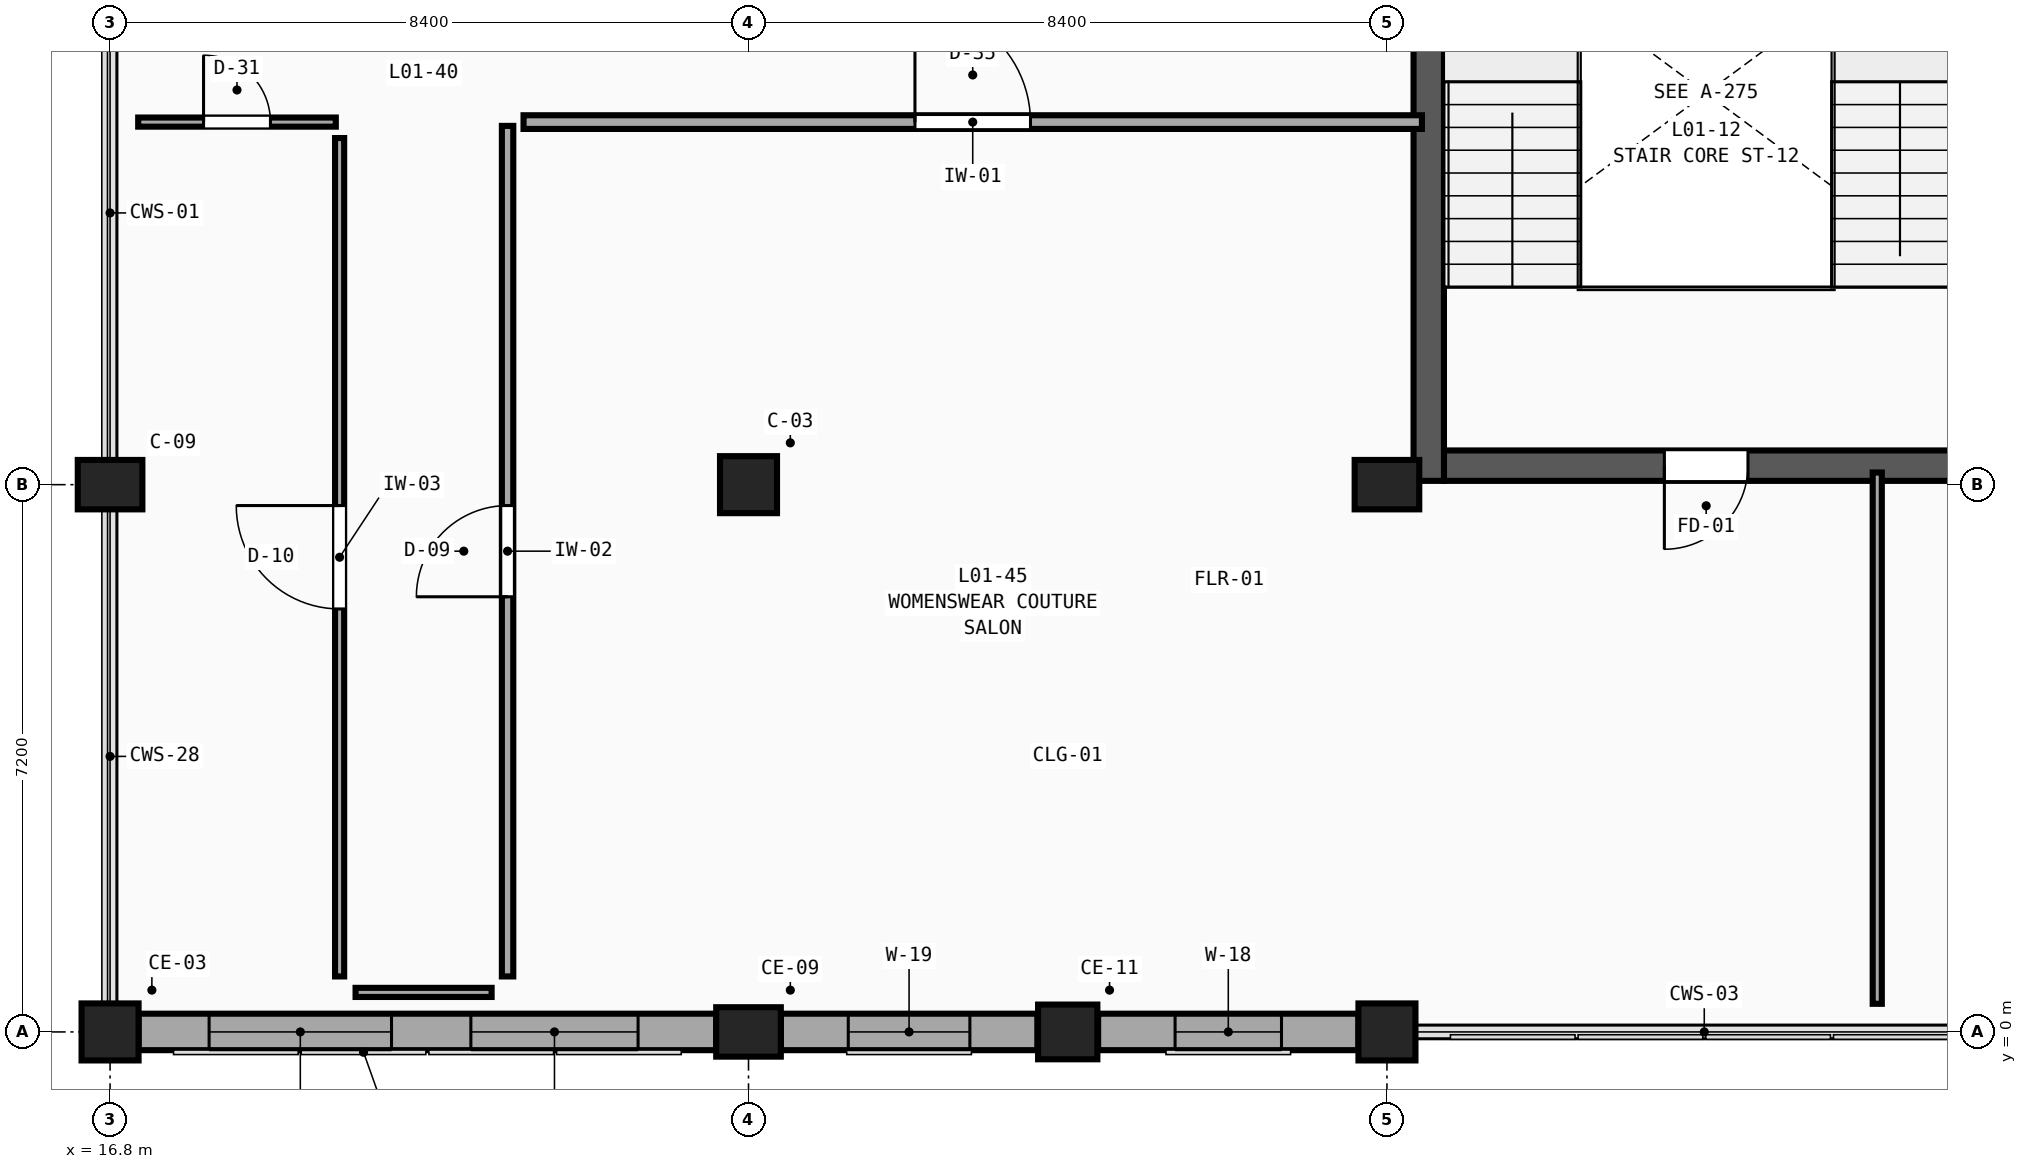
"""IFC4 building model, lengths in metres.
Left out: names, types, materials, properties, quantities, classifications, styles, units other than length and angle.
Written with IfcOpenShell. Run it as: python <this file> out.ifc"""

import sys

from ifc_helpers import new_model, si_unit, direction, frame, frame_2d, origin, origin_2d, place, context, subcontext, project, spatial, rectangle, extrude, element, fill, save


model = new_model("IFC4")
c1 = context("Model", 3, precision=1e-05, world=origin(), true_north=direction((0.0, 1.0)))
c2 = subcontext(c1, "Body", "Model", "MODEL_VIEW")
j1 = project(units=[si_unit("LENGTHUNIT", "METRE"), si_unit("PLANEANGLEUNIT", "RADIAN")], contexts=[c1])
p1 = place(None, origin())
s1 = spatial("IfcSite", under=j1, at=p1, CompositionType="ELEMENT")
p2 = place(p1, origin())
s2 = spatial("IfcBuilding", under=s1, at=p2, CompositionType="ELEMENT")
p3 = place(p2, frame((0.0, 0.0, 5.4)))
s3 = spatial("IfcBuildingStorey", under=s2, at=p3, CompositionType="ELEMENT", Elevation=5.4)
p4 = place(p3, frame((16.8, 0.0, 0.0), z_axis=(0.0, 0.0, 1.0), x_axis=(1.0, 0.0, 0.0)))
e1 = element("IfcColumn", 1, at=p4, inside=s3, PredefinedType="COLUMN", context=c2, shape_type="SweptSolid", body=[
    extrude(rectangle(XDim=0.75, YDim=0.75, at=origin_2d()), origin(), (0.0, 0.0, 1.0), 4.5),
])
for number, where, z_axis, x_axis in (
    (2, (16.8, 7.2, 0.0), (0.0, 0.0, 1.0), (1.0, 0.0, 0.0)),
    (3, (25.2, 0.0, 0.0), (0.0, 0.0, 1.0), (1.0, 0.0, 0.0)),
):
    element("IfcColumn", number, at=place(p3, frame(where, z_axis=z_axis, x_axis=x_axis)), inside=s3, PredefinedType="COLUMN", context=c2, shape_type="SweptSolid", body=[
        extrude(rectangle(XDim=0.85, YDim=0.65, at=origin_2d()), origin(), (0.0, 0.0, 1.0), 4.5),
    ])
for number, where, z_axis, x_axis in (
    (4, (25.2, 7.2, 0.0), (0.0, 0.0, 1.0), (1.0, 0.0, 0.0)),
    (5, (33.6, 0.0, 0.0), (0.0, 0.0, 1.0), (1.0, 0.0, 0.0)),
):
    element("IfcColumn", number, at=place(p3, frame(where, z_axis=z_axis, x_axis=x_axis)), inside=s3, PredefinedType="COLUMN", context=c2, shape_type="SweptSolid", body=[
        extrude(rectangle(XDim=0.75, YDim=0.75, at=origin_2d()), origin(), (0.0, 0.0, 1.0), 4.5),
    ])
p5 = place(p3, frame((33.6, 7.2, 0.0), z_axis=(0.0, 0.0, 1.0), x_axis=(1.0, 0.0, 0.0)))
e6 = element("IfcColumn", 6, at=p5, inside=s3, PredefinedType="COLUMN", context=c2, shape_type="SweptSolid", body=[
    extrude(rectangle(XDim=0.85, YDim=0.65, at=origin_2d()), origin(), (0.0, 0.0, 1.0), 4.5),
])
p6 = place(p3, frame((29.4, 0.0, 0.0), z_axis=(0.0, 0.0, 1.0), x_axis=(1.0, 0.0, 0.0)))
e7 = element("IfcColumn", 7, at=p6, inside=s3, PredefinedType="PILASTER", context=c2, shape_type="SweptSolid", body=[
    extrude(rectangle(XDim=0.78, YDim=0.72, at=origin_2d()), origin(), (0.0, 0.0, 1.0), 4.5),
])
p7 = place(p3, frame((24.775, 0.0, 0.0), z_axis=(0.0, 0.0, 1.0), x_axis=(-1.0, 0.0, 0.0)))
e8 = element("IfcWall", 8, at=p7, inside=s3, PredefinedType="SOLIDWALL", context=c2, shape_type="SweptSolid", body=[
    extrude(rectangle(XDim=7.6, YDim=0.48, at=frame_2d((3.8, 0.0))), origin(), (0.0, 0.0, 1.0), 3.63),
])
p8 = place(p7, frame((1.028, 0.0, 0.75)))
e9 = element("IfcOpeningElement", 9, at=p8, cuts=e8, PredefinedType="OPENING", context=c2, shape_type="SweptSolid", body=[
    extrude(rectangle(XDim=2.2, YDim=2.08, at=frame_2d((1.1, 1.04))), frame((0.0, 0.26, 0.0), z_axis=(0.0, -1.0, 0.0), x_axis=(1.0, 0.0, 0.0)), (0.0, 0.0, 1.0), 0.52),
])
p9 = place(p7, frame((4.272, 0.0, 0.75)))
e10 = element("IfcOpeningElement", 10, at=p9, cuts=e8, PredefinedType="OPENING", context=c2, shape_type="SweptSolid", body=[
    extrude(rectangle(XDim=2.4, YDim=2.08, at=frame_2d((1.2, 1.04))), frame((0.0, 0.26, 0.0), z_axis=(0.0, -1.0, 0.0), x_axis=(1.0, 0.0, 0.0)), (0.0, 0.0, 1.0), 0.52),
])
p10 = place(p3, frame((33.225, 0.0, 0.0), z_axis=(0.0, 0.0, 1.0), x_axis=(-1.0, 0.0, 0.0)))
e11 = element("IfcWall", 11, at=p10, inside=s3, PredefinedType="SOLIDWALL", context=c2, shape_type="SweptSolid", body=[
    extrude(rectangle(XDim=3.425, YDim=0.48, at=frame_2d((1.712, 0.0))), origin(), (0.0, 0.0, 1.0), 3.63),
])
p11 = place(p10, frame((1.012, 0.0, 0.75)))
e12 = element("IfcOpeningElement", 12, at=p11, cuts=e11, PredefinedType="OPENING", context=c2, shape_type="SweptSolid", body=[
    extrude(rectangle(XDim=1.4, YDim=2.26, at=frame_2d((0.7, 1.13))), frame((0.0, 0.26, 0.0), z_axis=(0.0, -1.0, 0.0), x_axis=(1.0, 0.0, 0.0)), (0.0, 0.0, 1.0), 0.52),
])
p12 = place(p3, frame((29.0, 0.0, 0.0), z_axis=(0.0, 0.0, 1.0), x_axis=(-1.0, 0.0, 0.0)))
e13 = element("IfcWall", 13, at=p12, inside=s3, PredefinedType="SOLIDWALL", context=c2, shape_type="SweptSolid", body=[
    extrude(rectangle(XDim=3.375, YDim=0.48, at=frame_2d((1.688, 0.0))), origin(), (0.0, 0.0, 1.0), 3.63),
])
p13 = place(p12, frame((0.887, 0.0, 0.75)))
e14 = element("IfcOpeningElement", 14, at=p13, cuts=e13, PredefinedType="OPENING", context=c2, shape_type="SweptSolid", body=[
    extrude(rectangle(XDim=1.6, YDim=2.26, at=frame_2d((0.8, 1.13))), frame((0.0, 0.26, 0.0), z_axis=(0.0, -1.0, 0.0), x_axis=(1.0, 0.0, 0.0)), (0.0, 0.0, 1.0), 0.52),
])
p14 = place(p3, frame((41.25, 7.45, 0.0), z_axis=(0.0, 0.0, 1.0), x_axis=(-1.0, 0.0, 0.0)))
e15 = element("IfcWall", 15, at=p14, inside=s3, PredefinedType="SHEAR", context=c2, shape_type="SweptSolid", body=[
    extrude(rectangle(XDim=6.9, YDim=0.4, at=frame_2d((3.45, 0.0))), origin(), (0.0, 0.0, 1.0), 4.5),
])
p15 = place(p14, frame((2.9, 0.0, 0.0)))
e16 = element("IfcOpeningElement", 16, at=p15, cuts=e15, PredefinedType="OPENING", context=c2, shape_type="SweptSolid", body=[
    extrude(rectangle(XDim=1.1, YDim=2.2, at=frame_2d((0.55, 1.1))), frame((0.0, 0.22, 0.0), z_axis=(0.0, -1.0, 0.0), x_axis=(1.0, 0.0, 0.0)), (0.0, 0.0, 1.0), 0.44),
])
p16 = place(p3, frame((34.15, 15.3, 0.0), z_axis=(0.0, 0.0, 1.0), x_axis=(0.0, -1.0, 0.0)))
e17 = element("IfcWall", 17, at=p16, inside=s3, PredefinedType="SHEAR", context=c2, shape_type="SweptSolid", body=[
    extrude(rectangle(XDim=8.05, YDim=0.4, at=frame_2d((4.025, 0.0))), origin(), (0.0, 0.0, 1.0), 4.5),
])
p17 = place(p3, frame((22.24, 11.97, 0.0), z_axis=(0.0, 0.0, 1.0), x_axis=(1.0, 0.0, 0.0)))
e18 = element("IfcWall", 18, at=p17, inside=s3, PredefinedType="PARTITIONING", context=c2, shape_type="SweptSolid", body=[
    extrude(rectangle(XDim=11.82, YDim=0.18, at=frame_2d((5.91, 0.0))), origin(), (0.0, 0.0, 1.0), 4.18),
])
p18 = place(p17, frame((5.15, 0.0, 0.0)))
e19 = element("IfcOpeningElement", 19, at=p18, cuts=e18, PredefinedType="OPENING", context=c2, shape_type="SweptSolid", body=[
    extrude(rectangle(XDim=1.52, YDim=2.45, at=frame_2d((0.76, 1.225))), frame((0.0, 0.11, 0.0), z_axis=(0.0, -1.0, 0.0), x_axis=(1.0, 0.0, 0.0)), (0.0, 0.0, 1.0), 0.22),
])
p19 = place(p3, frame((22.03, 0.73, 0.0), z_axis=(0.0, 0.0, 1.0), x_axis=(0.0, 1.0, 0.0)))
e20 = element("IfcWall", 20, at=p19, inside=s3, PredefinedType="PARTITIONING", context=c2, shape_type="SweptSolid", body=[
    extrude(rectangle(XDim=11.19, YDim=0.15, at=frame_2d((5.595, 0.0))), origin(), (0.0, 0.0, 1.0), 4.18),
])
p20 = place(p19, frame((4.995, 0.0, 0.0)))
e21 = element("IfcOpeningElement", 21, at=p20, cuts=e20, PredefinedType="OPENING", context=c2, shape_type="SweptSolid", body=[
    extrude(rectangle(XDim=1.2, YDim=2.13, at=frame_2d((0.6, 1.065))), frame((0.0, 0.095, 0.0), z_axis=(0.0, -1.0, 0.0), x_axis=(1.0, 0.0, 0.0)), (0.0, 0.0, 1.0), 0.19),
])
p21 = place(p3, frame((19.82, 0.73, 0.0), z_axis=(0.0, 0.0, 1.0), x_axis=(0.0, 1.0, 0.0)))
e22 = element("IfcWall", 22, at=p21, inside=s3, PredefinedType="PARTITIONING", context=c2, shape_type="SweptSolid", body=[
    extrude(rectangle(XDim=11.03, YDim=0.12, at=frame_2d((5.515, 0.0))), origin(), (0.0, 0.0, 1.0), 4.18),
])
p22 = place(p21, frame((4.835, 0.0, 0.0)))
e23 = element("IfcOpeningElement", 23, at=p22, cuts=e22, PredefinedType="OPENING", context=c2, shape_type="SweptSolid", body=[
    extrude(rectangle(XDim=1.36, YDim=2.13, at=frame_2d((0.68, 1.065))), frame((0.0, 0.08, 0.0), z_axis=(0.0, -1.0, 0.0), x_axis=(1.0, 0.0, 0.0)), (0.0, 0.0, 1.0), 0.16),
])
p23 = place(p3, frame((17.17, 11.97, 0.0), z_axis=(0.0, 0.0, 1.0), x_axis=(1.0, 0.0, 0.0)))
e24 = element("IfcWall", 24, at=p23, inside=s3, PredefinedType="PARTITIONING", context=c2, shape_type="SweptSolid", body=[
    extrude(rectangle(XDim=2.6, YDim=0.12, at=frame_2d((1.3, 0.0))), origin(), (0.0, 0.0, 1.0), 4.18),
])
p24 = place(p23, frame((0.86, 0.0, 0.0)))
e25 = element("IfcOpeningElement", 25, at=p24, cuts=e24, PredefinedType="OPENING", context=c2, shape_type="SweptSolid", body=[
    extrude(rectangle(XDim=0.88, YDim=2.45, at=frame_2d((0.44, 1.225))), frame((0.0, 0.08, 0.0), z_axis=(0.0, -1.0, 0.0), x_axis=(1.0, 0.0, 0.0)), (0.0, 0.0, 1.0), 0.16),
])
p25 = place(p3, frame((20.03, 0.52, 0.0), z_axis=(0.0, 0.0, 1.0), x_axis=(1.0, 0.0, 0.0)))
e26 = element("IfcWall", 26, at=p25, inside=s3, PredefinedType="PARTITIONING", context=c2, shape_type="SweptSolid", body=[
    extrude(rectangle(XDim=1.79, YDim=0.12, at=frame_2d((0.895, 0.0))), origin(), (0.0, 0.0, 1.0), 3.63),
])
p26 = place(p3, frame((40.051, 0.37, 0.0), z_axis=(0.0, 0.0, 1.0), x_axis=(0.0, 1.0, 0.0)))
e27 = element("IfcWall", 27, at=p26, inside=s3, PredefinedType="PARTITIONING", context=c2, shape_type="SweptSolid", body=[
    extrude(rectangle(XDim=6.99, YDim=0.12, at=frame_2d((3.495, 0.0))), origin(), (0.0, 0.0, 1.0), 4.18),
])
p27 = place(p8, origin())
e28 = element("IfcWindow", 28, at=p27, inside=s3, PartitioningType="TRIPLE_PANEL_VERTICAL", PredefinedType="WINDOW", context=c2, shape_type="SweptSolid", body=[
    extrude(rectangle(XDim=2.2, YDim=2.08, at=frame_2d((1.1, 1.04))), frame((0.0, 0.03, 0.0), z_axis=(0.0, -1.0, 0.0), x_axis=(1.0, 0.0, 0.0)), (0.0, 0.0, 1.0), 0.06),
])
fill(e9, e28)
p28 = place(p9, origin())
e29 = element("IfcWindow", 29, at=p28, inside=s3, PartitioningType="TRIPLE_PANEL_VERTICAL", PredefinedType="WINDOW", context=c2, shape_type="SweptSolid", body=[
    extrude(rectangle(XDim=2.4, YDim=2.08, at=frame_2d((1.2, 1.04))), frame((0.0, 0.03, 0.0), z_axis=(0.0, -1.0, 0.0), x_axis=(1.0, 0.0, 0.0)), (0.0, 0.0, 1.0), 0.06),
])
fill(e10, e29)
p29 = place(p11, origin())
e30 = element("IfcWindow", 30, at=p29, inside=s3, PartitioningType="DOUBLE_PANEL_VERTICAL", PredefinedType="WINDOW", context=c2, shape_type="SweptSolid", body=[
    extrude(rectangle(XDim=1.4, YDim=2.26, at=frame_2d((0.7, 1.13))), frame((0.0, 0.03, 0.0), z_axis=(0.0, -1.0, 0.0), x_axis=(1.0, 0.0, 0.0)), (0.0, 0.0, 1.0), 0.06),
])
fill(e12, e30)
p30 = place(p13, origin())
e31 = element("IfcWindow", 31, at=p30, inside=s3, PartitioningType="DOUBLE_PANEL_VERTICAL", PredefinedType="WINDOW", context=c2, shape_type="SweptSolid", body=[
    extrude(rectangle(XDim=1.6, YDim=2.26, at=frame_2d((0.8, 1.13))), frame((0.0, 0.03, 0.0), z_axis=(0.0, -1.0, 0.0), x_axis=(1.0, 0.0, 0.0)), (0.0, 0.0, 1.0), 0.06),
])
fill(e14, e31)
p31 = place(p15, origin())
e32 = element("IfcDoor", 32, at=p31, inside=s3, OperationType="SINGLE_SWING_RIGHT", PredefinedType="DOOR", context=c2, shape_type="SweptSolid", body=[
    extrude(rectangle(XDim=1.1, YDim=2.2, at=frame_2d((0.55, 1.1))), frame((0.0, 0.025, 0.0), z_axis=(0.0, -1.0, 0.0), x_axis=(1.0, 0.0, 0.0)), (0.0, 0.0, 1.0), 0.05),
])
fill(e16, e32)
p32 = place(p18, origin())
e33 = element("IfcDoor", 33, at=p32, inside=s3, OperationType="SINGLE_SWING_LEFT", PredefinedType="DOOR", context=c2, shape_type="SweptSolid", body=[
    extrude(rectangle(XDim=1.52, YDim=2.45, at=frame_2d((0.76, 1.225))), frame((0.0, 0.025, 0.0), z_axis=(0.0, -1.0, 0.0), x_axis=(1.0, 0.0, 0.0)), (0.0, 0.0, 1.0), 0.05),
])
fill(e19, e33)
p33 = place(p20, origin())
e34 = element("IfcDoor", 34, at=p33, inside=s3, OperationType="SINGLE_SWING_LEFT", PredefinedType="DOOR", context=c2, shape_type="SweptSolid", body=[
    extrude(rectangle(XDim=1.2, YDim=2.13, at=frame_2d((0.6, 1.065))), frame((0.0, 0.025, 0.0), z_axis=(0.0, -1.0, 0.0), x_axis=(1.0, 0.0, 0.0)), (0.0, 0.0, 1.0), 0.05),
])
fill(e21, e34)
p34 = place(p22, origin())
e35 = element("IfcDoor", 35, at=p34, inside=s3, OperationType="SINGLE_SWING_RIGHT", PredefinedType="DOOR", context=c2, shape_type="SweptSolid", body=[
    extrude(rectangle(XDim=1.36, YDim=2.13, at=frame_2d((0.68, 1.065))), frame((0.0, 0.025, 0.0), z_axis=(0.0, -1.0, 0.0), x_axis=(1.0, 0.0, 0.0)), (0.0, 0.0, 1.0), 0.05),
])
fill(e23, e35)
p35 = place(p24, origin())
e36 = element("IfcDoor", 36, at=p35, inside=s3, OperationType="SINGLE_SWING_LEFT", PredefinedType="DOOR", context=c2, shape_type="SweptSolid", body=[
    extrude(rectangle(XDim=0.88, YDim=2.45, at=frame_2d((0.44, 1.225))), frame((0.0, 0.025, 0.0), z_axis=(0.0, -1.0, 0.0), x_axis=(1.0, 0.0, 0.0)), (0.0, 0.0, 1.0), 0.05),
])
fill(e25, e36)
save(model, sys.argv[1])
